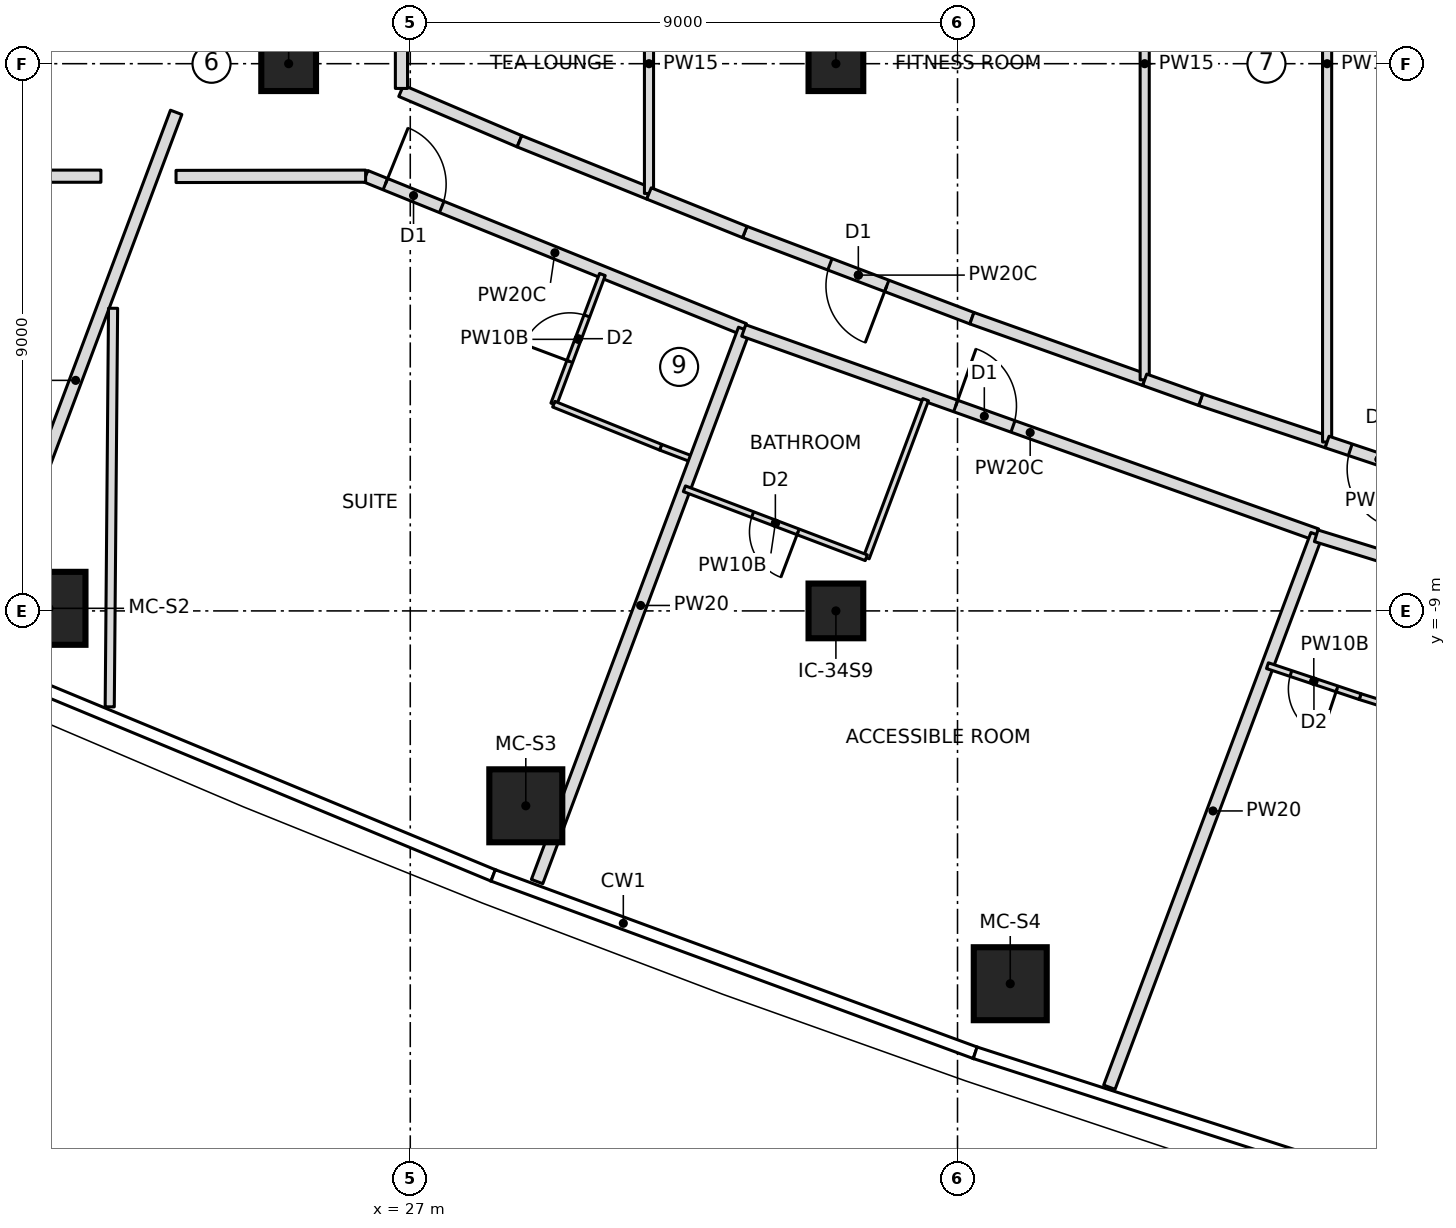
"""IFC4 building model, lengths in metres.
Left out: names, types, materials, properties, quantities, classifications, styles, units other than length and angle.
Written with IfcOpenShell. Run it as: python <this file> out.ifc"""

import sys

from ifc_helpers import new_model, si_unit, direction, frame, frame_2d, origin, origin_2d, place, context, subcontext, project, spatial, rectangle, extrude, element, fill, save


model = new_model("IFC4")
c1 = context("Model", 3, precision=1e-05, world=origin(), true_north=direction((0.0, 1.0)))
c2 = subcontext(c1, "Body", "Model", "MODEL_VIEW")
j1 = project(units=[si_unit("LENGTHUNIT", "METRE"), si_unit("PLANEANGLEUNIT", "RADIAN")], contexts=[c1])
p1 = place(None, origin())
s1 = spatial("IfcSite", under=j1, at=p1, CompositionType="ELEMENT")
p2 = place(p1, origin())
s2 = spatial("IfcBuilding", under=s1, at=p2, CompositionType="ELEMENT")
p3 = place(p2, frame((0.0, 0.0, 235.0)))
s3 = spatial("IfcBuildingStorey", under=s2, at=p3, CompositionType="ELEMENT", Elevation=235.0)
for number, where, z_axis, x_axis in (
    (1, (21.059, -8.958, 0.0), (0.0, 0.0, 1.0), (1.0, 0.0, 0.0)),
    (2, (28.9, -12.205, 0.0), (0.0, 0.0, 1.0), (1.0, 0.0, 0.0)),
    (3, (36.867, -15.132, 0.0), (0.0, 0.0, 1.0), (1.0, 0.0, 0.0)),
):
    element("IfcColumn", number, at=place(p3, frame(where, z_axis=z_axis, x_axis=x_axis)), inside=s3, PredefinedType="COLUMN", context=c2, shape_type="SweptSolid", body=[
        extrude(rectangle(XDim=1.2, YDim=1.2, at=origin_2d()), origin(), (0.0, 0.0, 1.0), 3.55),
    ])
for number, where, z_axis, x_axis in (
    (4, (25.0, 0.0, 0.0), (0.0, 0.0, 1.0), (1.0, 0.0, 0.0)),
    (5, (34.0, -9.0, 0.0), (0.0, 0.0, 1.0), (1.0, 0.0, 0.0)),
    (6, (34.0, 0.0, 0.0), (0.0, 0.0, 1.0), (1.0, 0.0, 0.0)),
):
    element("IfcColumn", number, at=place(p3, frame(where, z_axis=z_axis, x_axis=x_axis)), inside=s3, PredefinedType="COLUMN", context=c2, shape_type="SweptSolid", body=[
        extrude(rectangle(XDim=0.9, YDim=0.9, at=origin_2d()), origin(), (0.0, 0.0, 1.0), 3.55),
    ])
p4 = place(p3, frame((13.052, -1.85, 0.0), z_axis=(0.0, 0.0, 1.0), x_axis=(1.0, 0.0, 0.0)))
e7 = element("IfcWall", 7, at=p4, inside=s3, PredefinedType="PARTITIONING", context=c2, shape_type="SweptSolid", body=[
    extrude(rectangle(XDim=8.861, YDim=0.2, at=frame_2d((4.43, 0.0))), origin(), (0.0, 0.0, 1.0), 3.25),
])
p5 = place(p4, frame((3.93, 0.0, 0.0)))
e8 = element("IfcOpeningElement", 8, at=p5, cuts=e7, PredefinedType="OPENING", context=c2, shape_type="SweptSolid", body=[
    extrude(rectangle(XDim=1.0, YDim=2.1, at=frame_2d((0.5, 1.05))), frame((0.0, 0.11, 0.0), z_axis=(0.0, -1.0, 0.0), x_axis=(1.0, 0.0, 0.0)), (0.0, 0.0, 1.0), 0.22),
])
p6 = place(p3, frame((19.844, -9.616, 0.0), z_axis=(0.0, 0.0, 1.0), x_axis=(0.351123441588, 0.936329177569, 0.0)))
e9 = element("IfcWall", 9, at=p6, inside=s3, PredefinedType="PARTITIONING", context=c2, shape_type="SweptSolid", body=[
    extrude(rectangle(XDim=9.416, YDim=0.2, at=frame_2d((4.708, 0.0))), origin(), (0.0, 0.0, 1.0), 3.25),
])
p7 = place(p3, frame((26.266, -1.85, 0.0), z_axis=(0.0, 0.0, 1.0), x_axis=(0.927007906702, -0.375041785555, 0.0)))
e10 = element("IfcWall", 10, at=p7, inside=s3, PredefinedType="PARTITIONING", context=c2, shape_type="SweptSolid", body=[
    extrude(rectangle(XDim=6.716, YDim=0.2, at=frame_2d((3.358, 0.0))), origin(), (0.0, 0.0, 1.0), 3.25),
])
p8 = place(p7, frame((0.35, 0.0, 0.0)))
e11 = element("IfcOpeningElement", 11, at=p8, cuts=e10, PredefinedType="OPENING", context=c2, shape_type="SweptSolid", body=[
    extrude(rectangle(XDim=1.0, YDim=2.1, at=frame_2d((0.5, 1.05))), frame((0.0, 0.11, 0.0), z_axis=(0.0, -1.0, 0.0), x_axis=(1.0, 0.0, 0.0)), (0.0, 0.0, 1.0), 0.22),
])
p9 = place(p3, frame((29.36, -5.6, 0.0), z_axis=(0.0, 0.0, 1.0), x_axis=(0.351158682313, 0.936315961541, 0.0)))
e12 = element("IfcWall", 12, at=p9, inside=s3, PredefinedType="PARTITIONING", context=c2, shape_type="SweptSolid", body=[
    extrude(rectangle(XDim=2.278, YDim=0.1, at=frame_2d((1.139, 0.0))), origin(), (0.0, 0.0, 1.0), 3.25),
])
p10 = place(p9, frame((0.75, 0.0, 0.0)))
e13 = element("IfcOpeningElement", 13, at=p10, cuts=e12, PredefinedType="OPENING", context=c2, shape_type="SweptSolid", body=[
    extrude(rectangle(XDim=0.8, YDim=2.1, at=frame_2d((0.4, 1.05))), frame((0.0, 0.06, 0.0), z_axis=(0.0, -1.0, 0.0), x_axis=(1.0, 0.0, 0.0)), (0.0, 0.0, 1.0), 0.12),
])
p11 = place(p3, frame((31.684, -6.522, 0.0), z_axis=(0.0, 0.0, 1.0), x_axis=(-0.935048188903, 0.354520640342, 0.0)))
e14 = element("IfcWall", 14, at=p11, inside=s3, PredefinedType="PARTITIONING", context=c2, shape_type="SweptSolid", body=[
    extrude(rectangle(XDim=0.606, YDim=0.1, at=frame_2d((0.303, 0.0))), origin(), (0.0, 0.0, 1.0), 3.25),
])
p12 = place(p3, frame((31.117, -6.308, 0.0), z_axis=(0.0, 0.0, 1.0), x_axis=(-0.927594225674, 0.373589283166, 0.0)))
e15 = element("IfcWall", 15, at=p12, inside=s3, PredefinedType="PARTITIONING", context=c2, shape_type="SweptSolid", body=[
    extrude(rectangle(XDim=1.895, YDim=0.1, at=frame_2d((0.947, 0.0))), origin(), (0.0, 0.0, 1.0), 3.25),
])
p13 = place(p3, frame((29.086, -13.451, 0.0), z_axis=(0.0, 0.0, 1.0), x_axis=(0.351128958016, 0.93632710889, 0.0)))
e16 = element("IfcWall", 16, at=p13, inside=s3, PredefinedType="PARTITIONING", context=c2, shape_type="SweptSolid", body=[
    extrude(rectangle(XDim=9.7, YDim=0.2, at=frame_2d((4.85, 0.0))), origin(), (0.0, 0.0, 1.0), 3.25),
])
p14 = place(p3, frame((32.485, -4.388, 0.0), z_axis=(0.0, 0.0, 1.0), x_axis=(0.941953797829, -0.335742524498, 0.0)))
e17 = element("IfcWall", 17, at=p14, inside=s3, PredefinedType="PARTITIONING", context=c2, shape_type="SweptSolid", body=[
    extrude(rectangle(XDim=10.001, YDim=0.2, at=frame_2d((5.001, 0.0))), origin(), (0.0, 0.0, 1.0), 3.25),
])
p15 = place(p14, frame((3.7, 0.0, 0.0)))
e18 = element("IfcOpeningElement", 18, at=p15, cuts=e17, PredefinedType="OPENING", context=c2, shape_type="SweptSolid", body=[
    extrude(rectangle(XDim=1.0, YDim=2.1, at=frame_2d((0.5, 1.05))), frame((0.0, 0.11, 0.0), z_axis=(0.0, -1.0, 0.0), x_axis=(1.0, 0.0, 0.0)), (0.0, 0.0, 1.0), 0.22),
])
p16 = place(p3, frame((35.475, -5.526, 0.0), z_axis=(0.0, 0.0, 1.0), x_axis=(-0.351065630332, -0.936350854755, 0.0)))
e19 = element("IfcWall", 19, at=p16, inside=s3, PredefinedType="PARTITIONING", context=c2, shape_type="SweptSolid", body=[
    extrude(rectangle(XDim=2.777, YDim=0.1, at=frame_2d((1.388, 0.0))), origin(), (0.0, 0.0, 1.0), 3.25),
])
p17 = place(p3, frame((34.5, -8.126, 0.0), z_axis=(0.0, 0.0, 1.0), x_axis=(-0.934948661714, 0.354783032232, 0.0)))
e20 = element("IfcWall", 20, at=p17, inside=s3, PredefinedType="PARTITIONING", context=c2, shape_type="SweptSolid", body=[
    extrude(rectangle(XDim=3.2, YDim=0.1, at=frame_2d((1.6, 0.0))), origin(), (0.0, 0.0, 1.0), 3.25),
])
p18 = place(p17, frame((1.2, 0.0, 0.0)))
e21 = element("IfcOpeningElement", 21, at=p18, cuts=e20, PredefinedType="OPENING", context=c2, shape_type="SweptSolid", body=[
    extrude(rectangle(XDim=0.8, YDim=2.1, at=frame_2d((0.4, 1.05))), frame((0.0, 0.06, 0.0), z_axis=(0.0, -1.0, 0.0), x_axis=(1.0, 0.0, 0.0)), (0.0, 0.0, 1.0), 0.12),
])
p19 = place(p3, frame((38.497, -16.834, 0.0), z_axis=(0.0, 0.0, 1.0), x_axis=(0.35112895446, 0.936327110224, 0.0)))
e22 = element("IfcWall", 22, at=p19, inside=s3, PredefinedType="PARTITIONING", context=c2, shape_type="SweptSolid", body=[
    extrude(rectangle(XDim=9.706, YDim=0.2, at=frame_2d((4.853, 0.0))), origin(), (0.0, 0.0, 1.0), 3.25),
])
p20 = place(p3, frame((43.128, -10.568, 0.0), z_axis=(0.0, 0.0, 1.0), x_axis=(-0.954618903587, 0.297830067176, 0.0)))
e23 = element("IfcWall", 23, at=p20, inside=s3, PredefinedType="PARTITIONING", context=c2, shape_type="SweptSolid", body=[
    extrude(rectangle(XDim=0.531, YDim=0.1, at=frame_2d((0.266, 0.0))), origin(), (0.0, 0.0, 1.0), 3.25),
])
p21 = place(p3, frame((42.621, -10.409, 0.0), z_axis=(0.0, 0.0, 1.0), x_axis=(-0.948485479965, 0.3168206027, 0.0)))
e24 = element("IfcWall", 24, at=p21, inside=s3, PredefinedType="PARTITIONING", context=c2, shape_type="SweptSolid", body=[
    extrude(rectangle(XDim=1.606, YDim=0.1, at=frame_2d((0.803, 0.0))), origin(), (0.0, 0.0, 1.0), 3.25),
])
p22 = place(p21, frame((0.4, 0.0, 0.0)))
e25 = element("IfcOpeningElement", 25, at=p22, cuts=e24, PredefinedType="OPENING", context=c2, shape_type="SweptSolid", body=[
    extrude(rectangle(XDim=0.8, YDim=2.1, at=frame_2d((0.4, 1.05))), frame((0.0, 0.06, 0.0), z_axis=(0.0, -1.0, 0.0), x_axis=(1.0, 0.0, 0.0)), (0.0, 0.0, 1.0), 0.12),
])
p23 = place(p3, frame((28.796, -1.276, 0.0), z_axis=(0.0, 0.0, 1.0), x_axis=(-0.91990756443, 0.392135273732, 0.0)))
e26 = element("IfcWall", 26, at=p23, inside=s3, PredefinedType="PARTITIONING", context=c2, shape_type="SweptSolid", body=[
    extrude(rectangle(XDim=2.115, YDim=0.2, at=frame_2d((1.058, 0.0))), origin(), (0.0, 0.0, 1.0), 3.25),
])
p24 = place(p3, frame((30.926, -2.134, 0.0), z_axis=(0.0, 0.0, 1.0), x_axis=(-0.927609077038, 0.373552406224, 0.0)))
e27 = element("IfcWall", 27, at=p24, inside=s3, PredefinedType="PARTITIONING", context=c2, shape_type="SweptSolid", body=[
    extrude(rectangle(XDim=2.297, YDim=0.2, at=frame_2d((1.148, 0.0))), origin(), (0.0, 0.0, 1.0), 3.25),
])
p25 = place(p3, frame((30.926, -2.134, 0.0), z_axis=(0.0, 0.0, 1.0), x_axis=(0.0, 1.0, 0.0)))
e28 = element("IfcWall", 28, at=p25, inside=s3, PredefinedType="PARTITIONING", context=c2, shape_type="SweptSolid", body=[
    extrude(rectangle(XDim=4.268, YDim=0.15, at=frame_2d((2.134, 0.0))), origin(), (0.0, 0.0, 1.0), 3.25),
])
p26 = place(p3, frame((36.236, -4.186, 0.0), z_axis=(0.0, 0.0, 1.0), x_axis=(-0.934950696546, 0.354777669856, 0.0)))
e29 = element("IfcWall", 29, at=p26, inside=s3, PredefinedType="PARTITIONING", context=c2, shape_type="SweptSolid", body=[
    extrude(rectangle(XDim=3.995, YDim=0.2, at=frame_2d((1.997, 0.0))), origin(), (0.0, 0.0, 1.0), 3.25),
])
p27 = place(p26, frame((1.498, 0.0, 0.0)))
e30 = element("IfcOpeningElement", 30, at=p27, cuts=e29, PredefinedType="OPENING", context=c2, shape_type="SweptSolid", body=[
    extrude(rectangle(XDim=1.0, YDim=2.1, at=frame_2d((0.5, 1.05))), frame((0.0, 0.11, 0.0), z_axis=(0.0, -1.0, 0.0), x_axis=(1.0, 0.0, 0.0)), (0.0, 0.0, 1.0), 0.22),
])
p28 = place(p3, frame((39.078, -5.199, 0.0), z_axis=(0.0, 0.0, 1.0), x_axis=(-0.941908381697, 0.335869916023, 0.0)))
e31 = element("IfcWall", 31, at=p28, inside=s3, PredefinedType="PARTITIONING", context=c2, shape_type="SweptSolid", body=[
    extrude(rectangle(XDim=3.017, YDim=0.2, at=frame_2d((1.509, 0.0))), origin(), (0.0, 0.0, 1.0), 3.25),
])
p29 = place(p3, frame((32.501, -2.768, 0.0), z_axis=(0.0, 0.0, 1.0), x_axis=(-0.927641577565, 0.373471690456, 0.0)))
e32 = element("IfcWall", 32, at=p29, inside=s3, PredefinedType="PARTITIONING", context=c2, shape_type="SweptSolid", body=[
    extrude(rectangle(XDim=1.698, YDim=0.2, at=frame_2d((0.849, 0.0))), origin(), (0.0, 0.0, 1.0), 3.25),
])
p30 = place(p3, frame((39.078, -5.199, 0.0), z_axis=(0.0, 0.0, 1.0), x_axis=(0.0, 1.0, 0.0)))
e33 = element("IfcWall", 33, at=p30, inside=s3, PredefinedType="PARTITIONING", context=c2, shape_type="SweptSolid", body=[
    extrude(rectangle(XDim=10.398, YDim=0.15, at=frame_2d((5.199, 0.0))), origin(), (0.0, 0.0, 1.0), 3.25),
])
p31 = place(p3, frame((42.078, -6.222, 0.0), z_axis=(0.0, 0.0, 1.0), x_axis=(-0.9484714727, 0.316862534034, 0.0)))
e34 = element("IfcWall", 34, at=p31, inside=s3, PredefinedType="PARTITIONING", context=c2, shape_type="SweptSolid", body=[
    extrude(rectangle(XDim=2.192, YDim=0.2, at=frame_2d((1.096, 0.0))), origin(), (0.0, 0.0, 1.0), 3.25),
])
p32 = place(p3, frame((39.999, -5.527, 0.0), z_axis=(0.0, 0.0, 1.0), x_axis=(-0.941911279377, 0.335861789704, 0.0)))
e35 = element("IfcWall", 35, at=p32, inside=s3, PredefinedType="PARTITIONING", context=c2, shape_type="SweptSolid", body=[
    extrude(rectangle(XDim=0.978, YDim=0.2, at=frame_2d((0.489, 0.0))), origin(), (0.0, 0.0, 1.0), 3.25),
])
p33 = place(p3, frame((42.078, -6.222, 0.0), z_axis=(0.0, 0.0, 1.0), x_axis=(0.0, 1.0, 0.0)))
e36 = element("IfcWall", 36, at=p33, inside=s3, PredefinedType="PARTITIONING", context=c2, shape_type="SweptSolid", body=[
    extrude(rectangle(XDim=12.444, YDim=0.15, at=frame_2d((6.222, 0.0))), origin(), (0.0, 0.0, 1.0), 3.25),
])
p34 = place(p3, frame((43.788, -6.793, 0.0), z_axis=(0.0, 0.0, 1.0), x_axis=(-0.948466406859, 0.316877697323, 0.0)))
e37 = element("IfcWall", 37, at=p34, inside=s3, PredefinedType="PARTITIONING", context=c2, shape_type="SweptSolid", body=[
    extrude(rectangle(XDim=1.803, YDim=0.2, at=frame_2d((0.901, 0.0))), origin(), (0.0, 0.0, 1.0), 3.25),
])
p35 = place(p34, frame((0.402, 0.0, 0.0)))
e38 = element("IfcOpeningElement", 38, at=p35, cuts=e37, PredefinedType="OPENING", context=c2, shape_type="SweptSolid", body=[
    extrude(rectangle(XDim=1.0, YDim=2.1, at=frame_2d((0.5, 1.05))), frame((0.0, 0.11, 0.0), z_axis=(0.0, -1.0, 0.0), x_axis=(1.0, 0.0, 0.0)), (0.0, 0.0, 1.0), 0.22),
])
p36 = place(p3, frame((22.112, -4.023, 0.0), z_axis=(0.0, 0.0, 1.0), x_axis=(-0.008379594055, -0.999964890585, 0.0)))
e39 = element("IfcWall", 39, at=p36, inside=s3, PredefinedType="PARTITIONING", context=c2, shape_type="SweptSolid", body=[
    extrude(rectangle(XDim=6.555, YDim=0.15, at=frame_2d((3.278, 0.0))), origin(), (0.0, 0.0, 1.0), 3.25),
])
p37 = place(p3, frame((41.898, -7.764, 0.0), z_axis=(0.0, 0.0, 1.0), x_axis=(0.955502033518, -0.294984514752, 0.0)))
e40 = element("IfcWall", 40, at=p37, inside=s3, PredefinedType="PARTITIONING", context=c2, shape_type="SweptSolid", body=[
    extrude(rectangle(XDim=6.7, YDim=0.2, at=frame_2d((3.35, 0.0))), origin(), (0.0, 0.0, 1.0), 3.25),
])
p38 = place(p37, frame((3.95, 0.0, 0.0)))
e41 = element("IfcOpeningElement", 41, at=p38, cuts=e40, PredefinedType="OPENING", context=c2, shape_type="SweptSolid", body=[
    extrude(rectangle(XDim=1.5, YDim=2.1, at=frame_2d((0.75, 1.05))), frame((0.0, 0.11, 0.0), z_axis=(0.0, -1.0, 0.0), x_axis=(1.0, 0.0, 0.0)), (0.0, 0.0, 1.0), 0.22),
])
p39 = place(p3, frame((26.855, -0.407, 0.0), z_axis=(0.0, 0.0, 1.0), x_axis=(0.0, 1.0, 0.0)))
e42 = element("IfcWall", 42, at=p39, inside=s3, PredefinedType="PARTITIONING", context=c2, shape_type="SweptSolid", body=[
    extrude(rectangle(XDim=0.814, YDim=0.2, at=frame_2d((0.407, 0.0))), origin(), (0.0, 0.0, 1.0), 3.25),
])
p40 = place(p3, frame((23.148, -1.854, 0.0), z_axis=(0.0, 0.0, 1.0), x_axis=(0.999999006581, 0.001409552241, 0.0)))
e43 = element("IfcWall", 43, at=p40, inside=s3, PredefinedType="PARTITIONING", context=c2, shape_type="SweptSolid", body=[
    extrude(rectangle(XDim=3.118, YDim=0.2, at=frame_2d((1.559, 0.0))), origin(), (0.0, 0.0, 1.0), 3.25),
])
p41 = place(p10, origin())
e44 = element("IfcDoor", 44, at=p41, inside=s3, OperationType="SINGLE_SWING_LEFT", PredefinedType="DOOR", context=c2, shape_type="SweptSolid", body=[
    extrude(rectangle(XDim=0.8, YDim=2.1, at=frame_2d((0.4, 1.05))), frame((0.0, 0.025, 0.0), z_axis=(0.0, -1.0, 0.0), x_axis=(1.0, 0.0, 0.0)), (0.0, 0.0, 1.0), 0.05),
])
fill(e13, e44)
p42 = place(p8, origin())
e45 = element("IfcDoor", 45, at=p42, inside=s3, OperationType="SINGLE_SWING_LEFT", PredefinedType="DOOR", context=c2, shape_type="SweptSolid", body=[
    extrude(rectangle(XDim=1.0, YDim=2.1, at=frame_2d((0.5, 1.05))), frame((0.0, 0.025, 0.0), z_axis=(0.0, -1.0, 0.0), x_axis=(1.0, 0.0, 0.0)), (0.0, 0.0, 1.0), 0.05),
])
fill(e11, e45)
p43 = place(p18, origin())
e46 = element("IfcDoor", 46, at=p43, inside=s3, OperationType="SINGLE_SWING_LEFT", PredefinedType="DOOR", context=c2, shape_type="SweptSolid", body=[
    extrude(rectangle(XDim=0.8, YDim=2.1, at=frame_2d((0.4, 1.05))), frame((0.0, 0.025, 0.0), z_axis=(0.0, -1.0, 0.0), x_axis=(1.0, 0.0, 0.0)), (0.0, 0.0, 1.0), 0.05),
])
fill(e21, e46)
p44 = place(p15, origin())
e47 = element("IfcDoor", 47, at=p44, inside=s3, OperationType="SINGLE_SWING_LEFT", PredefinedType="DOOR", context=c2, shape_type="SweptSolid", body=[
    extrude(rectangle(XDim=1.0, YDim=2.1, at=frame_2d((0.5, 1.05))), frame((0.0, 0.025, 0.0), z_axis=(0.0, -1.0, 0.0), x_axis=(1.0, 0.0, 0.0)), (0.0, 0.0, 1.0), 0.05),
])
fill(e18, e47)
p45 = place(p22, origin())
e48 = element("IfcDoor", 48, at=p45, inside=s3, OperationType="SINGLE_SWING_LEFT", PredefinedType="DOOR", context=c2, shape_type="SweptSolid", body=[
    extrude(rectangle(XDim=0.8, YDim=2.1, at=frame_2d((0.4, 1.05))), frame((0.0, 0.025, 0.0), z_axis=(0.0, -1.0, 0.0), x_axis=(1.0, 0.0, 0.0)), (0.0, 0.0, 1.0), 0.05),
])
fill(e25, e48)
p46 = place(p27, origin())
e49 = element("IfcDoor", 49, at=p46, inside=s3, OperationType="SINGLE_SWING_LEFT", PredefinedType="DOOR", context=c2, shape_type="SweptSolid", body=[
    extrude(rectangle(XDim=1.0, YDim=2.1, at=frame_2d((0.5, 1.05))), frame((0.0, 0.025, 0.0), z_axis=(0.0, -1.0, 0.0), x_axis=(1.0, 0.0, 0.0)), (0.0, 0.0, 1.0), 0.05),
])
fill(e30, e49)
p47 = place(p35, origin())
e50 = element("IfcDoor", 50, at=p47, inside=s3, OperationType="SINGLE_SWING_LEFT", PredefinedType="DOOR", context=c2, shape_type="SweptSolid", body=[
    extrude(rectangle(XDim=1.0, YDim=2.1, at=frame_2d((0.5, 1.05))), frame((0.0, 0.025, 0.0), z_axis=(0.0, -1.0, 0.0), x_axis=(1.0, 0.0, 0.0)), (0.0, 0.0, 1.0), 0.05),
])
fill(e38, e50)
save(model, sys.argv[1])
